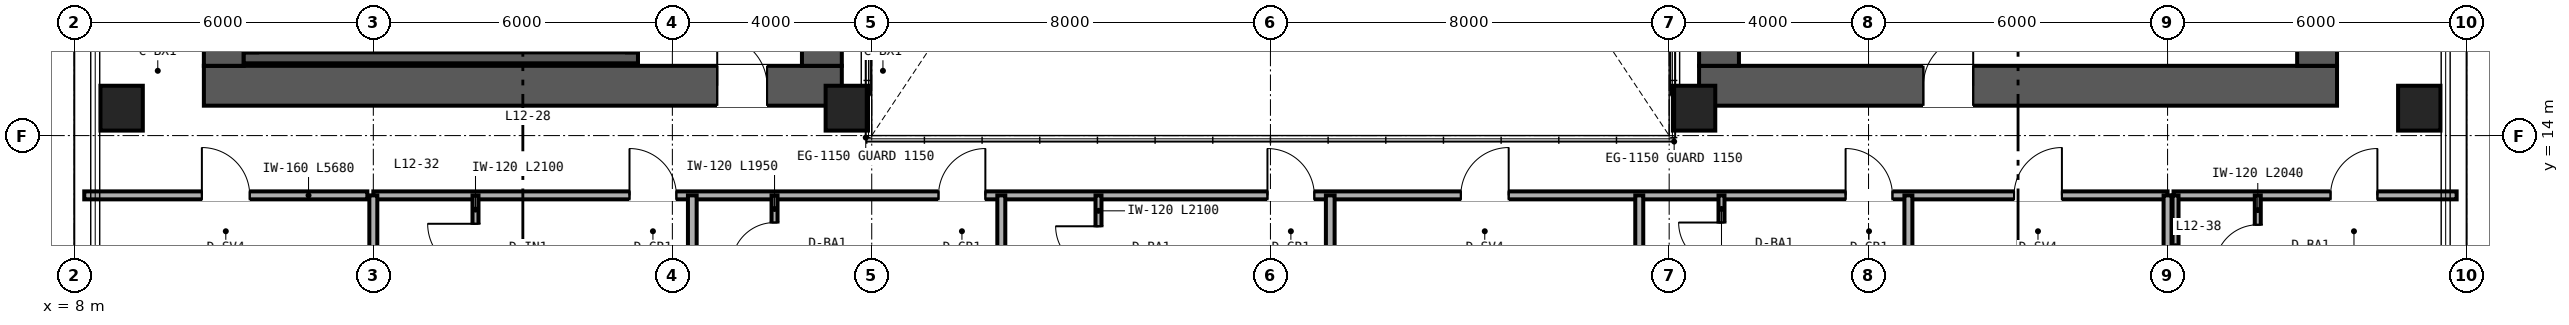
"""IFC4 building model, lengths in metres.
Left out: names, types, materials, properties, quantities, classifications, styles, units other than length and angle.
Written with IfcOpenShell. Run it as: python <this file> out.ifc"""

import sys

from ifc_helpers import new_model, si_unit, direction, frame, frame_2d, origin, origin_2d, place, context, subcontext, project, spatial, rectangle, hollow_rectangle, extrude, source, transform, mapped, element, fill, save


model = new_model("IFC4")
c1 = context("Model", 3, precision=1e-05, world=origin(), true_north=direction((0.0, 1.0)))
c2 = subcontext(c1, "Body", "Model", "MODEL_VIEW")
j1 = project(units=[si_unit("LENGTHUNIT", "METRE"), si_unit("PLANEANGLEUNIT", "RADIAN")], contexts=[c1])
p1 = place(None, origin())
s1 = spatial("IfcSite", under=j1, at=p1, CompositionType="ELEMENT")
p2 = place(p1, origin())
s2 = spatial("IfcBuilding", under=s1, at=p2, CompositionType="ELEMENT")
p3 = place(p2, frame((0.0, 0.0, 52.8)))
s3 = spatial("IfcBuildingStorey", under=s2, at=p3, CompositionType="ELEMENT", Elevation=52.8)
p4 = place(p3, frame((10.6, 15.0, 0.0), z_axis=(0.0, 0.0, 1.0), x_axis=(1.0, 0.0, 0.0)))
e1 = element("IfcWall", 1, at=p4, inside=s3, PredefinedType="SHEAR", context=c2, shape_type="SweptSolid", body=[
    extrude(rectangle(XDim=12.8, YDim=0.8, at=frame_2d((6.4, 0.0))), origin(), (0.0, 0.0, 1.0), 3.35),
])
p5 = place(p4, frame((10.3, 0.0, 0.0)))
e2 = element("IfcOpeningElement", 2, at=p5, cuts=e1, PredefinedType="OPENING", context=c2, shape_type="SweptSolid", body=[
    extrude(rectangle(XDim=1.0, YDim=2.15, at=frame_2d((0.5, 1.075))), frame((0.0, 0.41, 0.0), z_axis=(0.0, -1.0, 0.0), x_axis=(1.0, 0.0, 0.0)), (0.0, 0.0, 1.0), 0.82),
])
for number, where, z_axis, x_axis in (
    (3, (11.0, 15.4, 0.0), (0.0, 0.0, 1.0), (0.0, 1.0, 0.0)),
    (4, (23.0, 15.4, 0.0), (0.0, 0.0, 1.0), (0.0, 1.0, 0.0)),
):
    element("IfcWall", number, at=place(p3, frame(where, z_axis=z_axis, x_axis=x_axis)), inside=s3, PredefinedType="SHEAR", context=c2, shape_type="SweptSolid", body=[
        extrude(rectangle(XDim=21.2, YDim=0.8, at=frame_2d((10.6, 0.0))), origin(), (0.0, 0.0, 1.0), 3.35),
    ])
p6 = place(p3, frame((40.6, 15.0, 0.0), z_axis=(0.0, 0.0, 1.0), x_axis=(1.0, 0.0, 0.0)))
e5 = element("IfcWall", 5, at=p6, inside=s3, PredefinedType="SHEAR", context=c2, shape_type="SweptSolid", body=[
    extrude(rectangle(XDim=12.8, YDim=0.8, at=frame_2d((6.4, 0.0))), origin(), (0.0, 0.0, 1.0), 3.35),
])
p7 = place(p6, frame((4.5, 0.0, 0.0)))
e6 = element("IfcOpeningElement", 6, at=p7, cuts=e5, PredefinedType="OPENING", context=c2, shape_type="SweptSolid", body=[
    extrude(rectangle(XDim=1.0, YDim=2.15, at=frame_2d((0.5, 1.075))), frame((0.0, 0.41, 0.0), z_axis=(0.0, -1.0, 0.0), x_axis=(1.0, 0.0, 0.0)), (0.0, 0.0, 1.0), 0.82),
])
for number, where, z_axis, x_axis in (
    (7, (41.0, 15.4, 0.0), (0.0, 0.0, 1.0), (0.0, 1.0, 0.0)),
    (8, (53.0, 15.4, 0.0), (0.0, 0.0, 1.0), (0.0, 1.0, 0.0)),
):
    element("IfcWall", number, at=place(p3, frame(where, z_axis=z_axis, x_axis=x_axis)), inside=s3, PredefinedType="SHEAR", context=c2, shape_type="SweptSolid", body=[
        extrude(rectangle(XDim=21.2, YDim=0.8, at=frame_2d((10.6, 0.0))), origin(), (0.0, 0.0, 1.0), 3.35),
    ])
p8 = place(p3, frame((11.4, 15.56, 0.0), z_axis=(0.0, 0.0, 1.0), x_axis=(1.0, 0.0, 0.0)))
e9 = element("IfcWall", 9, at=p8, inside=s3, PredefinedType="SHEAR", context=c2, shape_type="SweptSolid", body=[
    extrude(rectangle(XDim=7.91, YDim=0.22, at=frame_2d((3.955, 0.0))), origin(), (0.0, 0.0, 1.0), 3.4),
])
for number, where, z_axis, x_axis in (
    (10, (11.56, 15.67, 0.0), (0.0, 0.0, 1.0), (0.0, 1.0, 0.0)),
    (11, (19.2, 15.67, 0.0), (0.0, 0.0, 1.0), (0.0, 1.0, 0.0)),
):
    element("IfcWall", number, at=place(p3, frame(where, z_axis=z_axis, x_axis=x_axis)), inside=s3, PredefinedType="SHEAR", context=c2, shape_type="SweptSolid", body=[
        extrude(rectangle(XDim=3.28, YDim=0.22, at=frame_2d((1.64, 0.0))), origin(), (0.0, 0.0, 1.0), 3.4),
    ])
m1 = source(origin(), c2, "Body", "SweptSolid", [
    extrude(hollow_rectangle(XDim=0.85, YDim=0.9, WallThickness=0.04, at=origin_2d()), origin(), (0.0, 0.0, 1.0), 3.35),
])
for number, where, z_axis, x_axis in (
    (12, (8.95, 14.55, 0.0), (0.0, 0.0, 1.0), (1.0, 0.0, 0.0)),
    (13, (23.5, 14.55, 0.0), (0.0, 0.0, 1.0), (1.0, 0.0, 0.0)),
    (14, (40.5, 14.55, 0.0), (0.0, 0.0, 1.0), (1.0, 0.0, 0.0)),
    (15, (55.05, 14.55, 0.0), (0.0, 0.0, 1.0), (1.0, 0.0, 0.0)),
):
    element("IfcColumn", number, at=place(p3, frame(where, z_axis=z_axis, x_axis=x_axis)), inside=s3, PredefinedType="COLUMN", context=c2, shape_type="MappedRepresentation", body=[
        mapped(m1, transform((0.0, 0.0, 0.0), scale=1.0)),
    ])
p9 = place(p3, frame((8.2, 12.8, 0.0), z_axis=(0.0, 0.0, 1.0), x_axis=(1.0, 0.0, 0.0)))
e16 = element("IfcWall", 16, at=p9, inside=s3, PredefinedType="PARTITIONING", context=c2, shape_type="SweptSolid", body=[
    extrude(rectangle(XDim=5.68, YDim=0.16, at=frame_2d((2.84, 0.0))), origin(), (0.0, 0.0, 1.0), 3.35),
])
p10 = place(p9, frame((2.36, 0.0, 0.0)))
e17 = element("IfcOpeningElement", 17, at=p10, cuts=e16, PredefinedType="OPENING", context=c2, shape_type="SweptSolid", body=[
    extrude(rectangle(XDim=0.96, YDim=2.15, at=frame_2d((0.48, 1.075))), frame((0.0, 0.09, 0.0), z_axis=(0.0, -1.0, 0.0), x_axis=(1.0, 0.0, 0.0)), (0.0, 0.0, 1.0), 0.18),
])
p11 = place(p3, frame((50.12, 12.8, 0.0), z_axis=(0.0, 0.0, 1.0), x_axis=(1.0, 0.0, 0.0)))
e18 = element("IfcWall", 18, at=p11, inside=s3, PredefinedType="PARTITIONING", context=c2, shape_type="SweptSolid", body=[
    extrude(rectangle(XDim=5.68, YDim=0.16, at=frame_2d((2.84, 0.0))), origin(), (0.0, 0.0, 1.0), 3.35),
])
p12 = place(p11, frame((3.15, 0.0, 0.0)))
e19 = element("IfcOpeningElement", 19, at=p12, cuts=e18, PredefinedType="OPENING", context=c2, shape_type="SweptSolid", body=[
    extrude(rectangle(XDim=0.94, YDim=2.15, at=frame_2d((0.47, 1.075))), frame((0.0, 0.09, 0.0), z_axis=(0.0, -1.0, 0.0), x_axis=(1.0, 0.0, 0.0)), (0.0, 0.0, 1.0), 0.18),
])
p13 = place(p3, frame((51.81, 10.76, 0.0), z_axis=(0.0, 0.0, 1.0), x_axis=(0.0, 1.0, 0.0)))
e20 = element("IfcWall", 20, at=p13, inside=s3, PredefinedType="PARTITIONING", context=c2, shape_type="SweptSolid", body=[
    extrude(rectangle(XDim=2.04, YDim=0.12, at=frame_2d((1.02, 0.0))), origin(), (0.0, 0.0, 1.0), 3.35),
])
p14 = place(p13, frame((0.59, 0.0, 0.0)))
e21 = element("IfcOpeningElement", 21, at=p14, cuts=e20, PredefinedType="OPENING", context=c2, shape_type="SweptSolid", body=[
    extrude(rectangle(XDim=0.86, YDim=2.1, at=frame_2d((0.43, 1.05))), frame((0.0, 0.07, 0.0), z_axis=(0.0, -1.0, 0.0), x_axis=(1.0, 0.0, 0.0)), (0.0, 0.0, 1.0), 0.14),
])
p15 = place(p3, frame((50.16, 10.76, 0.0), z_axis=(0.0, 0.0, 1.0), x_axis=(0.0, 1.0, 0.0)))
e22 = element("IfcWall", 22, at=p15, inside=s3, PredefinedType="PARTITIONING", context=c2, shape_type="SweptSolid", body=[
    extrude(rectangle(XDim=2.04, YDim=0.12, at=frame_2d((1.02, 0.0))), origin(), (0.0, 0.0, 1.0), 3.35),
])
p16 = place(p3, frame((14.0, 12.8, 0.0), z_axis=(0.0, 0.0, 1.0), x_axis=(1.0, 0.0, 0.0)))
e23 = element("IfcWall", 23, at=p16, inside=s3, PredefinedType="PARTITIONING", context=c2, shape_type="SweptSolid", body=[
    extrude(rectangle(XDim=36.0, YDim=0.16, at=frame_2d((18.0, 0.0))), origin(), (0.0, 0.0, 1.0), 2.571),
])
p17 = place(p16, frame((5.14, 0.0, 0.0)))
e24 = element("IfcOpeningElement", 24, at=p17, cuts=e23, PredefinedType="OPENING", context=c2, shape_type="SweptSolid", body=[
    extrude(rectangle(XDim=0.94, YDim=2.15, at=frame_2d((0.47, 1.075))), frame((0.0, 0.09, 0.0), z_axis=(0.0, -1.0, 0.0), x_axis=(1.0, 0.0, 0.0)), (0.0, 0.0, 1.0), 0.18),
])
p18 = place(p16, frame((11.34, 0.0, 0.0)))
e25 = element("IfcOpeningElement", 25, at=p18, cuts=e23, PredefinedType="OPENING", context=c2, shape_type="SweptSolid", body=[
    extrude(rectangle(XDim=0.94, YDim=2.15, at=frame_2d((0.47, 1.075))), frame((0.0, 0.09, 0.0), z_axis=(0.0, -1.0, 0.0), x_axis=(1.0, 0.0, 0.0)), (0.0, 0.0, 1.0), 0.18),
])
p19 = place(p16, frame((17.94, 0.0, 0.0)))
e26 = element("IfcOpeningElement", 26, at=p19, cuts=e23, PredefinedType="OPENING", context=c2, shape_type="SweptSolid", body=[
    extrude(rectangle(XDim=0.94, YDim=2.15, at=frame_2d((0.47, 1.075))), frame((0.0, 0.09, 0.0), z_axis=(0.0, -1.0, 0.0), x_axis=(1.0, 0.0, 0.0)), (0.0, 0.0, 1.0), 0.18),
])
p20 = place(p16, frame((21.82, 0.0, 0.0)))
e27 = element("IfcOpeningElement", 27, at=p20, cuts=e23, PredefinedType="OPENING", context=c2, shape_type="SweptSolid", body=[
    extrude(rectangle(XDim=0.96, YDim=2.15, at=frame_2d((0.48, 1.075))), frame((0.0, 0.09, 0.0), z_axis=(0.0, -1.0, 0.0), x_axis=(1.0, 0.0, 0.0)), (0.0, 0.0, 1.0), 0.18),
])
p21 = place(p16, frame((29.54, 0.0, 0.0)))
e28 = element("IfcOpeningElement", 28, at=p21, cuts=e23, PredefinedType="OPENING", context=c2, shape_type="SweptSolid", body=[
    extrude(rectangle(XDim=0.94, YDim=2.15, at=frame_2d((0.47, 1.075))), frame((0.0, 0.09, 0.0), z_axis=(0.0, -1.0, 0.0), x_axis=(1.0, 0.0, 0.0)), (0.0, 0.0, 1.0), 0.18),
])
p22 = place(p16, frame((32.92, 0.0, 0.0)))
e29 = element("IfcOpeningElement", 29, at=p22, cuts=e23, PredefinedType="OPENING", context=c2, shape_type="SweptSolid", body=[
    extrude(rectangle(XDim=0.96, YDim=2.15, at=frame_2d((0.48, 1.075))), frame((0.0, 0.09, 0.0), z_axis=(0.0, -1.0, 0.0), x_axis=(1.0, 0.0, 0.0)), (0.0, 0.0, 1.0), 0.18),
])
for number, where, z_axis, x_axis in (
    (30, (14.0, 2.36, 0.0), (0.0, 0.0, 1.0), (0.0, 1.0, 0.0)),
    (31, (50.0, 2.36, 0.0), (0.0, 0.0, 1.0), (0.0, 1.0, 0.0)),
):
    element("IfcWall", number, at=place(p3, frame(where, z_axis=z_axis, x_axis=x_axis)), inside=s3, PredefinedType="PARTITIONING", context=c2, shape_type="SweptSolid", body=[
        extrude(rectangle(XDim=10.44, YDim=0.16, at=frame_2d((5.22, 0.0))), origin(), (0.0, 0.0, 1.0), 2.657),
    ])
p23 = place(p3, frame((20.4, 2.36, 0.0), z_axis=(0.0, 0.0, 1.0), x_axis=(0.0, 1.0, 0.0)))
e32 = element("IfcWall", 32, at=p23, inside=s3, PredefinedType="PARTITIONING", context=c2, shape_type="SweptSolid", body=[
    extrude(rectangle(XDim=10.44, YDim=0.175, at=frame_2d((5.22, 0.0))), origin(), (0.0, 0.0, 1.0), 2.813),
])
p24 = place(p3, frame((16.05, 10.7, 0.0), z_axis=(0.0, 0.0, 1.0), x_axis=(0.0, 1.0, 0.0)))
e33 = element("IfcWall", 33, at=p24, inside=s3, PredefinedType="PARTITIONING", context=c2, shape_type="SweptSolid", body=[
    extrude(rectangle(XDim=2.1, YDim=0.12, at=frame_2d((1.05, 0.0))), origin(), (0.0, 0.0, 1.0), 3.35),
])
p25 = place(p24, frame((0.57, 0.0, 0.0)))
e34 = element("IfcOpeningElement", 34, at=p25, cuts=e33, PredefinedType="OPENING", context=c2, shape_type="SweptSolid", body=[
    extrude(rectangle(XDim=0.96, YDim=2.15, at=frame_2d((0.48, 1.075))), frame((0.0, 0.07, 0.0), z_axis=(0.0, -1.0, 0.0), x_axis=(1.0, 0.0, 0.0)), (0.0, 0.0, 1.0), 0.14),
])
p26 = place(p3, frame((26.6, 2.36, 0.0), z_axis=(0.0, 0.0, 1.0), x_axis=(0.0, 1.0, 0.0)))
e35 = element("IfcWall", 35, at=p26, inside=s3, PredefinedType="PARTITIONING", context=c2, shape_type="SweptSolid", body=[
    extrude(rectangle(XDim=10.44, YDim=0.16, at=frame_2d((5.22, 0.0))), origin(), (0.0, 0.0, 1.0), 2.423),
])
p27 = place(p3, frame((22.05, 10.85, 0.0), z_axis=(0.0, 0.0, 1.0), x_axis=(0.0, 1.0, 0.0)))
e36 = element("IfcWall", 36, at=p27, inside=s3, PredefinedType="PARTITIONING", context=c2, shape_type="SweptSolid", body=[
    extrude(rectangle(XDim=1.95, YDim=0.12, at=frame_2d((0.975, 0.0))), origin(), (0.0, 0.0, 1.0), 3.35),
])
p28 = place(p27, frame((0.545, 0.0, 0.0)))
e37 = element("IfcOpeningElement", 37, at=p28, cuts=e36, PredefinedType="OPENING", context=c2, shape_type="SweptSolid", body=[
    extrude(rectangle(XDim=0.86, YDim=2.1, at=frame_2d((0.43, 1.05))), frame((0.0, 0.07, 0.0), z_axis=(0.0, -1.0, 0.0), x_axis=(1.0, 0.0, 0.0)), (0.0, 0.0, 1.0), 0.14),
])
p29 = place(p3, frame((33.2, 2.36, 0.0), z_axis=(0.0, 0.0, 1.0), x_axis=(0.0, 1.0, 0.0)))
e38 = element("IfcWall", 38, at=p29, inside=s3, PredefinedType="PARTITIONING", context=c2, shape_type="SweptSolid", body=[
    extrude(rectangle(XDim=10.44, YDim=0.175, at=frame_2d((5.22, 0.0))), origin(), (0.0, 0.0, 1.0), 2.423),
])
p30 = place(p3, frame((28.55, 10.7, 0.0), z_axis=(0.0, 0.0, 1.0), x_axis=(0.0, 1.0, 0.0)))
e39 = element("IfcWall", 39, at=p30, inside=s3, PredefinedType="PARTITIONING", context=c2, shape_type="SweptSolid", body=[
    extrude(rectangle(XDim=2.1, YDim=0.12, at=frame_2d((1.05, 0.0))), origin(), (0.0, 0.0, 1.0), 3.35),
])
p31 = place(p30, frame((0.62, 0.0, 0.0)))
e40 = element("IfcOpeningElement", 40, at=p31, cuts=e39, PredefinedType="OPENING", context=c2, shape_type="SweptSolid", body=[
    extrude(rectangle(XDim=0.86, YDim=2.1, at=frame_2d((0.43, 1.05))), frame((0.0, 0.07, 0.0), z_axis=(0.0, -1.0, 0.0), x_axis=(1.0, 0.0, 0.0)), (0.0, 0.0, 1.0), 0.14),
])
p32 = place(p3, frame((39.4, 2.36, 0.0), z_axis=(0.0, 0.0, 1.0), x_axis=(0.0, 1.0, 0.0)))
e41 = element("IfcWall", 41, at=p32, inside=s3, PredefinedType="PARTITIONING", context=c2, shape_type="SweptSolid", body=[
    extrude(rectangle(XDim=10.44, YDim=0.16, at=frame_2d((5.22, 0.0))), origin(), (0.0, 0.0, 1.0), 2.423),
])
p33 = place(p3, frame((44.8, 2.36, 0.0), z_axis=(0.0, 0.0, 1.0), x_axis=(0.0, 1.0, 0.0)))
e42 = element("IfcWall", 42, at=p33, inside=s3, PredefinedType="PARTITIONING", context=c2, shape_type="SweptSolid", body=[
    extrude(rectangle(XDim=10.44, YDim=0.16, at=frame_2d((5.22, 0.0))), origin(), (0.0, 0.0, 1.0), 2.657),
])
p34 = place(p3, frame((41.05, 10.85, 0.0), z_axis=(0.0, 0.0, 1.0), x_axis=(0.0, 1.0, 0.0)))
e43 = element("IfcWall", 43, at=p34, inside=s3, PredefinedType="PARTITIONING", context=c2, shape_type="SweptSolid", body=[
    extrude(rectangle(XDim=1.95, YDim=0.12, at=frame_2d((0.975, 0.0))), origin(), (0.0, 0.0, 1.0), 3.35),
])
p35 = place(p34, frame((0.545, 0.0, 0.0)))
e44 = element("IfcOpeningElement", 44, at=p35, cuts=e43, PredefinedType="OPENING", context=c2, shape_type="SweptSolid", body=[
    extrude(rectangle(XDim=0.86, YDim=2.1, at=frame_2d((0.43, 1.05))), frame((0.0, 0.07, 0.0), z_axis=(0.0, -1.0, 0.0), x_axis=(1.0, 0.0, 0.0)), (0.0, 0.0, 1.0), 0.14),
])
m2 = source(origin(), c2, "Body", "SweptSolid", [
    extrude(rectangle(XDim=1.0, YDim=2.15, at=frame_2d((0.5, 1.075))), frame((0.0, 0.025, 0.0), z_axis=(0.0, -1.0, 0.0), x_axis=(1.0, 0.0, 0.0)), (0.0, 0.0, 1.0), 0.05),
])
p36 = place(p5, origin())
e45 = element("IfcDoor", 45, at=p36, inside=s3, OperationType="SINGLE_SWING_LEFT", PredefinedType="DOOR", context=c2, shape_type="MappedRepresentation", body=[
    mapped(m2, transform((0.0, 0.0, 0.0), scale=1.0)),
])
fill(e2, e45)
p37 = place(p7, origin())
e46 = element("IfcDoor", 46, at=p37, inside=s3, OperationType="SINGLE_SWING_RIGHT", PredefinedType="DOOR", context=c2, shape_type="MappedRepresentation", body=[
    mapped(m2, transform((0.0, 0.0, 0.0), scale=1.0)),
])
fill(e6, e46)
m3 = source(origin(), c2, "Body", "SweptSolid", [
    extrude(rectangle(XDim=0.96, YDim=2.15, at=frame_2d((0.48, 1.075))), frame((0.0, 0.025, 0.0), z_axis=(0.0, -1.0, 0.0), x_axis=(1.0, 0.0, 0.0)), (0.0, 0.0, 1.0), 0.05),
])
p38 = place(p10, origin())
e47 = element("IfcDoor", 47, at=p38, inside=s3, OperationType="SINGLE_SWING_LEFT", PredefinedType="DOOR", context=c2, shape_type="MappedRepresentation", body=[
    mapped(m3, transform((0.0, 0.0, 0.0), scale=1.0)),
])
fill(e17, e47)
m4 = source(origin(), c2, "Body", "SweptSolid", [
    extrude(rectangle(XDim=0.86, YDim=2.1, at=frame_2d((0.43, 1.05))), frame((0.0, 0.025, 0.0), z_axis=(0.0, -1.0, 0.0), x_axis=(1.0, 0.0, 0.0)), (0.0, 0.0, 1.0), 0.05),
])
p39 = place(p14, origin())
e48 = element("IfcDoor", 48, at=p39, inside=s3, OperationType="SINGLE_SWING_LEFT", PredefinedType="DOOR", context=c2, shape_type="MappedRepresentation", body=[
    mapped(m4, transform((0.0, 0.0, 0.0), scale=1.0)),
])
fill(e21, e48)
m5 = source(origin(), c2, "Body", "SweptSolid", [
    extrude(rectangle(XDim=0.94, YDim=2.15, at=frame_2d((0.47, 1.075))), frame((0.0, 0.025, 0.0), z_axis=(0.0, -1.0, 0.0), x_axis=(1.0, 0.0, 0.0)), (0.0, 0.0, 1.0), 0.05),
])
p40 = place(p12, origin())
e49 = element("IfcDoor", 49, at=p40, inside=s3, OperationType="SINGLE_SWING_RIGHT", PredefinedType="DOOR", context=c2, shape_type="MappedRepresentation", body=[
    mapped(m5, transform((0.0, 0.0, 0.0), scale=1.0)),
])
fill(e19, e49)
p41 = place(p25, origin())
e50 = element("IfcDoor", 50, at=p41, inside=s3, OperationType="SINGLE_SWING_RIGHT", PredefinedType="DOOR", context=c2, shape_type="MappedRepresentation", body=[
    mapped(m3, transform((0.0, 0.0, 0.0), scale=1.0)),
])
fill(e34, e50)
p42 = place(p28, origin())
e51 = element("IfcDoor", 51, at=p42, inside=s3, OperationType="SINGLE_SWING_LEFT", PredefinedType="DOOR", context=c2, shape_type="MappedRepresentation", body=[
    mapped(m4, transform((0.0, 0.0, 0.0), scale=1.0)),
])
fill(e37, e51)
p43 = place(p31, origin())
e52 = element("IfcDoor", 52, at=p43, inside=s3, OperationType="SINGLE_SWING_RIGHT", PredefinedType="DOOR", context=c2, shape_type="MappedRepresentation", body=[
    mapped(m4, transform((0.0, 0.0, 0.0), scale=1.0)),
])
fill(e40, e52)
p44 = place(p35, origin())
e53 = element("IfcDoor", 53, at=p44, inside=s3, OperationType="SINGLE_SWING_RIGHT", PredefinedType="DOOR", context=c2, shape_type="MappedRepresentation", body=[
    mapped(m4, transform((0.0, 0.0, 0.0), scale=1.0)),
])
fill(e44, e53)
p45 = place(p17, origin())
e54 = element("IfcDoor", 54, at=p45, inside=s3, OperationType="SINGLE_SWING_LEFT", PredefinedType="DOOR", context=c2, shape_type="MappedRepresentation", body=[
    mapped(m5, transform((0.0, 0.0, 0.0), scale=1.0)),
])
fill(e24, e54)
p46 = place(p18, origin())
e55 = element("IfcDoor", 55, at=p46, inside=s3, OperationType="SINGLE_SWING_RIGHT", PredefinedType="DOOR", context=c2, shape_type="MappedRepresentation", body=[
    mapped(m5, transform((0.0, 0.0, 0.0), scale=1.0)),
])
fill(e25, e55)
p47 = place(p19, origin())
e56 = element("IfcDoor", 56, at=p47, inside=s3, OperationType="SINGLE_SWING_LEFT", PredefinedType="DOOR", context=c2, shape_type="MappedRepresentation", body=[
    mapped(m5, transform((0.0, 0.0, 0.0), scale=1.0)),
])
fill(e26, e56)
p48 = place(p20, origin())
e57 = element("IfcDoor", 57, at=p48, inside=s3, OperationType="SINGLE_SWING_RIGHT", PredefinedType="DOOR", context=c2, shape_type="MappedRepresentation", body=[
    mapped(m3, transform((0.0, 0.0, 0.0), scale=1.0)),
])
fill(e27, e57)
p49 = place(p21, origin())
e58 = element("IfcDoor", 58, at=p49, inside=s3, OperationType="SINGLE_SWING_LEFT", PredefinedType="DOOR", context=c2, shape_type="MappedRepresentation", body=[
    mapped(m5, transform((0.0, 0.0, 0.0), scale=1.0)),
])
fill(e28, e58)
p50 = place(p22, origin())
e59 = element("IfcDoor", 59, at=p50, inside=s3, OperationType="SINGLE_SWING_RIGHT", PredefinedType="DOOR", context=c2, shape_type="MappedRepresentation", body=[
    mapped(m3, transform((0.0, 0.0, 0.0), scale=1.0)),
])
fill(e29, e59)
save(model, sys.argv[1])
